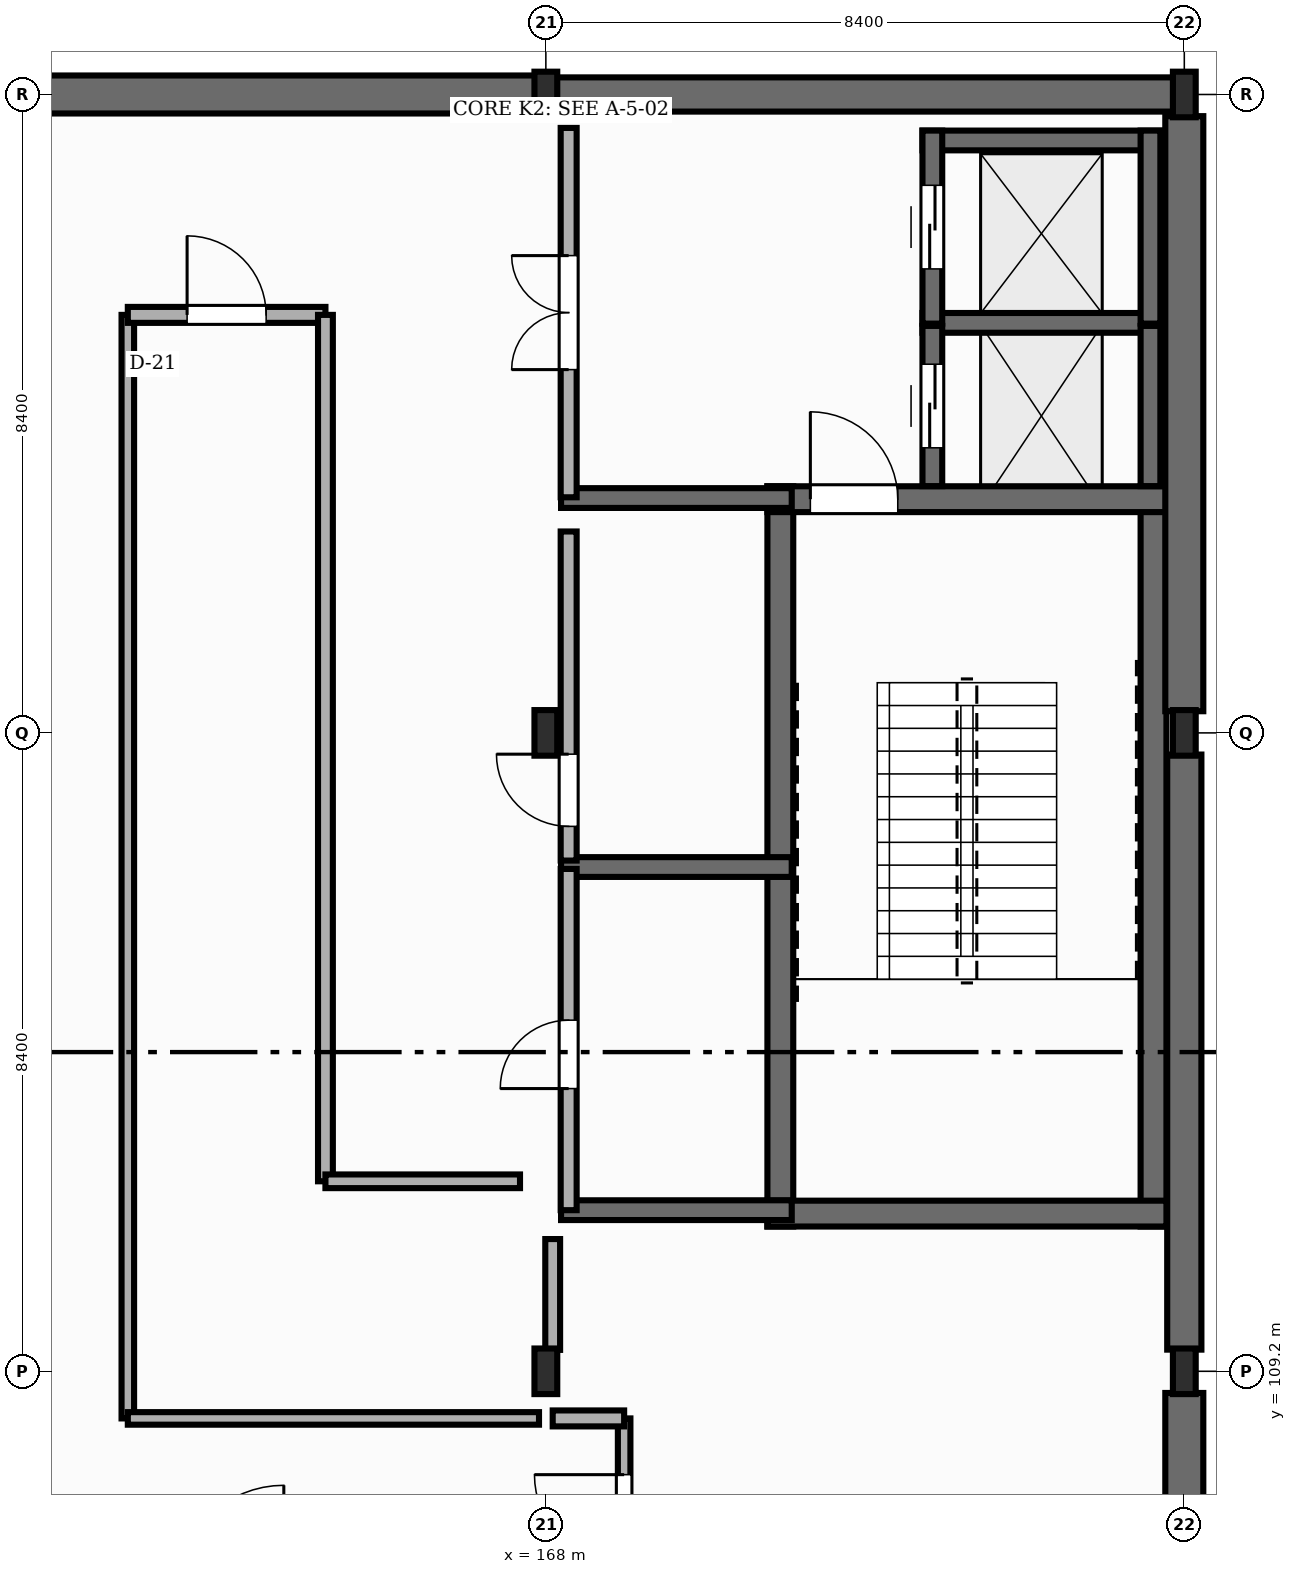
"""IFC4 building model, lengths in metres.
Left out: names, types, materials, properties, quantities, classifications, styles, units other than length and angle.
Written with IfcOpenShell. Run it as: python <this file> out.ifc"""

import sys

from ifc_helpers import new_model, si_unit, direction, frame, frame_2d, origin, origin_2d, place, context, subcontext, project, spatial, rectangle, i_section, extrude, element, fill, save


model = new_model("IFC4")
c1 = context("Model", 3, precision=1e-05, world=origin(), true_north=direction((0.0, 1.0)))
c2 = subcontext(c1, "Body", "Model", "MODEL_VIEW")
j1 = project(units=[si_unit("LENGTHUNIT", "METRE"), si_unit("PLANEANGLEUNIT", "RADIAN")], contexts=[c1])
p1 = place(None, origin())
s1 = spatial("IfcSite", under=j1, at=p1, CompositionType="ELEMENT")
p2 = place(p1, origin())
s2 = spatial("IfcBuilding", under=s1, at=p2, CompositionType="ELEMENT")
p3 = place(p2, frame((0.0, 0.0, -4.5)))
s3 = spatial("IfcBuildingStorey", under=s2, at=p3, CompositionType="ELEMENT", Elevation=-4.5)
for number, where, z_axis, x_axis in (
    (1, (168.0, 109.2, 0.0), (0.0, 0.0, 1.0), (1.0, 0.0, 0.0)),
    (2, (168.0, 117.6, 0.0), (0.0, 0.0, 1.0), (1.0, 0.0, 0.0)),
    (3, (168.0, 126.0, 0.0), (0.0, 0.0, 1.0), (1.0, 0.0, 0.0)),
    (4, (176.4, 109.2, 0.0), (0.0, 0.0, 1.0), (1.0, 0.0, 0.0)),
    (5, (176.4, 117.6, 0.0), (0.0, 0.0, 1.0), (1.0, 0.0, 0.0)),
    (6, (176.4, 126.0, 0.0), (0.0, 0.0, 1.0), (1.0, 0.0, 0.0)),
):
    element("IfcColumn", number, at=place(p3, frame(where, z_axis=z_axis, x_axis=x_axis)), inside=s3, PredefinedType="COLUMN", context=c2, shape_type="SweptSolid", body=[
        extrude(i_section(OverallWidth=0.3, OverallDepth=0.6, WebThickness=0.015, FlangeThickness=0.03, FilletRadius=0.027, at=origin_2d()), origin(), (0.0, 0.0, 1.0), 4.5),
    ])
p4 = place(p3, frame((176.4, 101.085, 0.0), z_axis=(0.0, 0.0, 1.0), x_axis=(0.0, 1.0, 0.0)))
e7 = element("IfcWall", 7, at=p4, inside=s3, PredefinedType="USERDEFINED", context=c2, shape_type="SweptSolid", body=[
    extrude(rectangle(XDim=7.83, YDim=0.5, at=frame_2d((3.915, 0.0))), origin(), (0.0, 0.0, 1.0), 4.25),
])
p5 = place(p3, frame((176.4, 109.485, 0.0), z_axis=(0.0, 0.0, 1.0), x_axis=(0.0, 1.0, 0.0)))
e8 = element("IfcWall", 8, at=p5, inside=s3, PredefinedType="USERDEFINED", context=c2, shape_type="SweptSolid", body=[
    extrude(rectangle(XDim=7.83, YDim=0.45, at=frame_2d((3.915, 0.0))), origin(), (0.0, 0.0, 1.0), 4.25),
])
p6 = place(p3, frame((176.392, 126.0, 0.0), z_axis=(0.0, 0.0, 1.0), x_axis=(-1.0, 0.0, 0.0)))
e9 = element("IfcWall", 9, at=p6, inside=s3, PredefinedType="USERDEFINED", context=c2, shape_type="SweptSolid", body=[
    extrude(rectangle(XDim=8.384, YDim=0.45, at=frame_2d((4.192, 0.0))), origin(), (0.0, 0.0, 1.0), 4.25),
])
p7 = place(p3, frame((167.992, 126.0, 0.0), z_axis=(0.0, 0.0, 1.0), x_axis=(-1.0, 0.0, 0.0)))
e10 = element("IfcWall", 10, at=p7, inside=s3, PredefinedType="USERDEFINED", context=c2, shape_type="SweptSolid", body=[
    extrude(rectangle(XDim=8.384, YDim=0.5, at=frame_2d((4.192, 0.0))), origin(), (0.0, 0.0, 1.0), 4.25),
])
for number, where, z_axis, x_axis in (
    (11, (171.085, 111.105, 0.0), (0.0, 0.0, 1.0), (0.0, 1.0, 0.0)),
    (12, (175.995, 111.105, 0.0), (0.0, 0.0, 1.0), (0.0, 1.0, 0.0)),
):
    element("IfcWall", number, at=place(p3, frame(where, z_axis=z_axis, x_axis=x_axis)), inside=s3, PredefinedType="SHEAR", context=c2, shape_type="SweptSolid", body=[
        extrude(rectangle(XDim=9.74, YDim=0.34, at=frame_2d((4.87, 0.0))), origin(), (0.0, 0.0, 1.0), 4.25),
    ])
p8 = place(p3, frame((170.915, 111.275, 0.0), z_axis=(0.0, 0.0, 1.0), x_axis=(1.0, 0.0, 0.0)))
e13 = element("IfcWall", 13, at=p8, inside=s3, PredefinedType="SHEAR", context=c2, shape_type="SweptSolid", body=[
    extrude(rectangle(XDim=5.25, YDim=0.34, at=frame_2d((2.625, 0.0))), origin(), (0.0, 0.0, 1.0), 4.25),
])
p9 = place(p3, frame((170.915, 120.675, 0.0), z_axis=(0.0, 0.0, 1.0), x_axis=(1.0, 0.0, 0.0)))
e14 = element("IfcWall", 14, at=p9, inside=s3, PredefinedType="SHEAR", context=c2, shape_type="SweptSolid", body=[
    extrude(rectangle(XDim=5.25, YDim=0.34, at=frame_2d((2.625, 0.0))), origin(), (0.0, 0.0, 1.0), 4.25),
])
p10 = place(p9, frame((0.565, 0.0, 0.0)))
e15 = element("IfcOpeningElement", 15, at=p10, cuts=e14, PredefinedType="OPENING", context=c2, shape_type="SweptSolid", body=[
    extrude(rectangle(XDim=1.15, YDim=2.15, at=frame_2d((0.575, 1.075))), frame((0.0, 0.18, 0.0), z_axis=(0.0, -1.0, 0.0), x_axis=(1.0, 0.0, 0.0)), (0.0, 0.0, 1.0), 0.36),
])
p11 = place(p3, frame((172.955, 122.995, 0.0), z_axis=(0.0, 0.0, 1.0), x_axis=(1.0, 0.0, 0.0)))
e16 = element("IfcWall", 16, at=p11, inside=s3, PredefinedType="SHEAR", context=c2, shape_type="SweptSolid", body=[
    extrude(rectangle(XDim=3.13, YDim=0.26, at=frame_2d((1.565, 0.0))), origin(), (0.0, 0.0, 1.0), 4.25),
])
p12 = place(p3, frame((175.955, 120.847, 0.0), z_axis=(0.0, 0.0, 1.0), x_axis=(0.0, 1.0, 0.0)))
e17 = element("IfcWall", 17, at=p12, inside=s3, PredefinedType="SHEAR", context=c2, shape_type="SweptSolid", body=[
    extrude(rectangle(XDim=2.108, YDim=0.26, at=frame_2d((1.054, 0.0))), origin(), (0.0, 0.0, 1.0), 4.25),
])
p13 = place(p3, frame((173.085, 120.847, 0.0), z_axis=(0.0, 0.0, 1.0), x_axis=(0.0, 1.0, 0.0)))
e18 = element("IfcWall", 18, at=p13, inside=s3, PredefinedType="SHEAR", context=c2, shape_type="SweptSolid", body=[
    extrude(rectangle(XDim=2.108, YDim=0.26, at=frame_2d((1.054, 0.0))), origin(), (0.0, 0.0, 1.0), 4.25),
])
p14 = place(p13, frame((0.504, 0.0, 0.0)))
e19 = element("IfcOpeningElement", 19, at=p14, cuts=e18, PredefinedType="OPENING", context=c2, shape_type="SweptSolid", body=[
    extrude(rectangle(XDim=1.1, YDim=2.15, at=frame_2d((0.55, 1.075))), frame((0.0, 0.14, 0.0), z_axis=(0.0, -1.0, 0.0), x_axis=(1.0, 0.0, 0.0)), (0.0, 0.0, 1.0), 0.28),
])
p15 = place(p3, frame((172.955, 125.395, 0.0), z_axis=(0.0, 0.0, 1.0), x_axis=(1.0, 0.0, 0.0)))
e20 = element("IfcWall", 20, at=p15, inside=s3, PredefinedType="SHEAR", context=c2, shape_type="SweptSolid", body=[
    extrude(rectangle(XDim=3.13, YDim=0.26, at=frame_2d((1.565, 0.0))), origin(), (0.0, 0.0, 1.0), 4.25),
])
p16 = place(p3, frame((175.955, 122.985, 0.0), z_axis=(0.0, 0.0, 1.0), x_axis=(0.0, 1.0, 0.0)))
e21 = element("IfcWall", 21, at=p16, inside=s3, PredefinedType="SHEAR", context=c2, shape_type="SweptSolid", body=[
    extrude(rectangle(XDim=2.54, YDim=0.26, at=frame_2d((1.27, 0.0))), origin(), (0.0, 0.0, 1.0), 4.25),
])
p17 = place(p3, frame((173.085, 122.985, 0.0), z_axis=(0.0, 0.0, 1.0), x_axis=(0.0, 1.0, 0.0)))
e22 = element("IfcWall", 22, at=p17, inside=s3, PredefinedType="SHEAR", context=c2, shape_type="SweptSolid", body=[
    extrude(rectangle(XDim=2.54, YDim=0.26, at=frame_2d((1.27, 0.0))), origin(), (0.0, 0.0, 1.0), 4.25),
])
p18 = place(p17, frame((0.72, 0.0, 0.0)))
e23 = element("IfcOpeningElement", 23, at=p18, cuts=e22, PredefinedType="OPENING", context=c2, shape_type="SweptSolid", body=[
    extrude(rectangle(XDim=1.1, YDim=2.15, at=frame_2d((0.55, 1.075))), frame((0.0, 0.14, 0.0), z_axis=(0.0, -1.0, 0.0), x_axis=(1.0, 0.0, 0.0)), (0.0, 0.0, 1.0), 0.28),
])
for number, where, z_axis, x_axis in (
    (24, (168.2, 111.32, 0.0), (0.0, 0.0, 1.0), (1.0, 0.0, 0.0)),
    (25, (168.2, 115.835, 0.0), (0.0, 0.0, 1.0), (1.0, 0.0, 0.0)),
    (26, (168.2, 120.69, 0.0), (0.0, 0.0, 1.0), (1.0, 0.0, 0.0)),
):
    element("IfcWall", number, at=place(p3, frame(where, z_axis=z_axis, x_axis=x_axis)), inside=s3, PredefinedType="SHEAR", context=c2, shape_type="SweptSolid", body=[
        extrude(rectangle(XDim=3.035, YDim=0.26, at=frame_2d((1.518, 0.0))), origin(), (0.0, 0.0, 1.0), 4.25),
    ])
p19 = place(p3, frame((168.3, 111.32, 0.0), z_axis=(0.0, 0.0, 1.0), x_axis=(0.0, 1.0, 0.0)))
e27 = element("IfcWall", 27, at=p19, inside=s3, PredefinedType="STANDARD", context=c2, shape_type="SweptSolid", body=[
    extrude(rectangle(XDim=4.49, YDim=0.21, at=frame_2d((2.245, 0.0))), origin(), (0.0, 0.0, 1.0), 3.922),
])
p20 = place(p19, frame((1.6, 0.0, 0.0)))
e28 = element("IfcOpeningElement", 28, at=p20, cuts=e27, PredefinedType="OPENING", context=c2, shape_type="SweptSolid", body=[
    extrude(rectangle(XDim=0.9, YDim=2.1, at=frame_2d((0.45, 1.05))), frame((0.0, 0.115, 0.0), z_axis=(0.0, -1.0, 0.0), x_axis=(1.0, 0.0, 0.0)), (0.0, 0.0, 1.0), 0.23),
])
p21 = place(p3, frame((168.3, 115.92, 0.0), z_axis=(0.0, 0.0, 1.0), x_axis=(0.0, 1.0, 0.0)))
e29 = element("IfcWall", 29, at=p21, inside=s3, PredefinedType="STANDARD", context=c2, shape_type="SweptSolid", body=[
    extrude(rectangle(XDim=4.33, YDim=0.21, at=frame_2d((2.165, 0.0))), origin(), (0.0, 0.0, 1.0), 3.632),
])
p22 = place(p21, frame((0.45, 0.0, 0.0)))
e30 = element("IfcOpeningElement", 30, at=p22, cuts=e29, PredefinedType="OPENING", context=c2, shape_type="SweptSolid", body=[
    extrude(rectangle(XDim=0.95, YDim=2.15, at=frame_2d((0.475, 1.075))), frame((0.0, 0.115, 0.0), z_axis=(0.0, -1.0, 0.0), x_axis=(1.0, 0.0, 0.0)), (0.0, 0.0, 1.0), 0.23),
])
p23 = place(p3, frame((168.3, 120.7, 0.0), z_axis=(0.0, 0.0, 1.0), x_axis=(0.0, 1.0, 0.0)))
e31 = element("IfcWall", 31, at=p23, inside=s3, PredefinedType="STANDARD", context=c2, shape_type="SweptSolid", body=[
    extrude(rectangle(XDim=4.86, YDim=0.21, at=frame_2d((2.43, 0.0))), origin(), (0.0, 0.0, 1.0), 3.632),
])
p24 = place(p23, frame((1.68, 0.0, 0.0)))
e32 = element("IfcOpeningElement", 32, at=p24, cuts=e31, PredefinedType="OPENING", context=c2, shape_type="SweptSolid", body=[
    extrude(rectangle(XDim=1.5, YDim=2.2, at=frame_2d((0.75, 1.1))), frame((0.0, 0.115, 0.0), z_axis=(0.0, -1.0, 0.0), x_axis=(1.0, 0.0, 0.0)), (0.0, 0.0, 1.0), 0.23),
])
p25 = place(p3, frame((169.03, 106.3, -0.004), z_axis=(0.0, 0.0, 1.0), x_axis=(0.0, 1.0, 0.0)))
e33 = element("IfcWall", 33, at=p25, inside=s3, PredefinedType="STANDARD", context=c2, shape_type="SweptSolid", body=[
    extrude(rectangle(XDim=2.28, YDim=0.165, at=frame_2d((1.14, 0.0))), origin(), (0.0, 0.0, 1.0), 4.254),
])
p26 = place(p25, frame((0.36, 0.0, 0.015)))
e34 = element("IfcOpeningElement", 34, at=p26, cuts=e33, PredefinedType="OPENING", context=c2, shape_type="SweptSolid", body=[
    extrude(rectangle(XDim=1.18, YDim=2.14, at=frame_2d((0.59, 1.07))), frame((0.0, 0.093, 0.0), z_axis=(0.0, -1.0, 0.0), x_axis=(1.0, 0.0, 0.0)), (0.0, 0.0, 1.0), 0.185),
])
p27 = place(p3, frame((169.03, 108.58, -0.004), z_axis=(0.0, 0.0, 1.0), x_axis=(-1.0, 0.0, 0.0)))
e35 = element("IfcWall", 35, at=p27, inside=s3, PredefinedType="STANDARD", context=c2, shape_type="SweptSolid", body=[
    extrude(rectangle(XDim=0.94, YDim=0.21, at=frame_2d((0.47, 0.0))), origin(), (0.0, 0.0, 1.0), 4.254),
])
p28 = place(p3, frame((168.09, 109.482, -0.004), z_axis=(0.0, 0.0, 1.0), x_axis=(0.0, 1.0, 0.0)))
e36 = element("IfcWall", 36, at=p28, inside=s3, PredefinedType="STANDARD", context=c2, shape_type="SweptSolid", body=[
    extrude(rectangle(XDim=1.458, YDim=0.195, at=frame_2d((0.729, 0.0))), origin(), (0.0, 0.0, 1.0), 3.926),
])
p29 = place(p3, frame((162.5, 108.58, -0.004), z_axis=(0.0, 0.0, 1.0), x_axis=(0.0, 1.0, 0.0)))
e37 = element("IfcWall", 37, at=p29, inside=s3, PredefinedType="STANDARD", context=c2, shape_type="SweptSolid", body=[
    extrude(rectangle(XDim=14.52, YDim=0.165, at=frame_2d((7.26, 0.0))), origin(), (0.0, 0.0, 1.0), 3.936),
])
p30 = place(p3, frame((162.5, 123.1, -0.004), z_axis=(0.0, 0.0, 1.0), x_axis=(1.0, 0.0, 0.0)))
e38 = element("IfcWall", 38, at=p30, inside=s3, PredefinedType="STANDARD", context=c2, shape_type="SweptSolid", body=[
    extrude(rectangle(XDim=2.6, YDim=0.21, at=frame_2d((1.3, 0.0))), origin(), (0.0, 0.0, 1.0), 4.254),
])
p31 = place(p30, frame((0.78, 0.0, 0.015)))
e39 = element("IfcOpeningElement", 39, at=p31, cuts=e38, PredefinedType="OPENING", context=c2, shape_type="SweptSolid", body=[
    extrude(rectangle(XDim=1.04, YDim=2.22, at=frame_2d((0.52, 1.11))), frame((0.0, 0.115, 0.0), z_axis=(0.0, -1.0, 0.0), x_axis=(1.0, 0.0, 0.0)), (0.0, 0.0, 1.0), 0.23),
])
p32 = place(p3, frame((165.1, 123.1, -0.004), z_axis=(0.0, 0.0, 1.0), x_axis=(0.0, -1.0, 0.0)))
e40 = element("IfcWall", 40, at=p32, inside=s3, PredefinedType="STANDARD", context=c2, shape_type="SweptSolid", body=[
    extrude(rectangle(XDim=11.4, YDim=0.195, at=frame_2d((5.7, 0.0))), origin(), (0.0, 0.0, 1.0), 3.966),
])
p33 = place(p3, frame((165.1, 111.7, -0.004), z_axis=(0.0, 0.0, 1.0), x_axis=(1.0, 0.0, 0.0)))
e41 = element("IfcWall", 41, at=p33, inside=s3, PredefinedType="STANDARD", context=c2, shape_type="SweptSolid", body=[
    extrude(rectangle(XDim=2.56, YDim=0.18, at=frame_2d((1.28, 0.0))), origin(), (0.0, 0.0, 1.0), 4.254),
])
p34 = place(p3, frame((167.91, 108.58, -0.004), z_axis=(0.0, 0.0, 1.0), x_axis=(-1.0, 0.0, 0.0)))
e42 = element("IfcWall", 42, at=p34, inside=s3, PredefinedType="STANDARD", context=c2, shape_type="SweptSolid", body=[
    extrude(rectangle(XDim=5.41, YDim=0.165, at=frame_2d((2.705, 0.0))), origin(), (0.0, 0.0, 1.0), 4.254),
])
p35 = place(p3, frame((176.4, 117.885, 0.0), z_axis=(0.0, 0.0, 1.0), x_axis=(0.0, 1.0, 0.0)))
e43 = element("IfcWall", 43, at=p35, inside=s3, PredefinedType="USERDEFINED", context=c2, shape_type="SweptSolid", body=[
    extrude(rectangle(XDim=7.83, YDim=0.5, at=frame_2d((3.915, 0.0))), origin(), (0.0, 0.0, 1.0), 4.25),
])
p36 = place(p10, origin())
e44 = element("IfcDoor", 44, at=p36, inside=s3, OperationType="SINGLE_SWING_LEFT", PredefinedType="DOOR", context=c2, shape_type="SweptSolid", body=[
    extrude(rectangle(XDim=1.15, YDim=2.15, at=frame_2d((0.575, 1.075))), frame((0.0, 0.025, 0.0), z_axis=(0.0, -1.0, 0.0), x_axis=(1.0, 0.0, 0.0)), (0.0, 0.0, 1.0), 0.05),
])
fill(e15, e44)
p37 = place(p14, origin())
e45 = element("IfcDoor", 45, at=p37, inside=s3, OperationType="DOUBLE_DOOR_SLIDING", PredefinedType="DOOR", context=c2, shape_type="SweptSolid", body=[
    extrude(rectangle(XDim=1.1, YDim=2.15, at=frame_2d((0.55, 1.075))), frame((0.0, 0.025, 0.0), z_axis=(0.0, -1.0, 0.0), x_axis=(1.0, 0.0, 0.0)), (0.0, 0.0, 1.0), 0.05),
])
fill(e19, e45)
p38 = place(p18, origin())
e46 = element("IfcDoor", 46, at=p38, inside=s3, OperationType="DOUBLE_DOOR_SLIDING", PredefinedType="DOOR", context=c2, shape_type="SweptSolid", body=[
    extrude(rectangle(XDim=1.1, YDim=2.15, at=frame_2d((0.55, 1.075))), frame((0.0, 0.025, 0.0), z_axis=(0.0, -1.0, 0.0), x_axis=(1.0, 0.0, 0.0)), (0.0, 0.0, 1.0), 0.05),
])
fill(e23, e46)
p39 = place(p20, origin())
e47 = element("IfcDoor", 47, at=p39, inside=s3, OperationType="SINGLE_SWING_LEFT", PredefinedType="DOOR", context=c2, shape_type="SweptSolid", body=[
    extrude(rectangle(XDim=0.9, YDim=2.1, at=frame_2d((0.45, 1.05))), frame((0.0, 0.025, 0.0), z_axis=(0.0, -1.0, 0.0), x_axis=(1.0, 0.0, 0.0)), (0.0, 0.0, 1.0), 0.05),
])
fill(e28, e47)
p40 = place(p22, origin())
e48 = element("IfcDoor", 48, at=p40, inside=s3, OperationType="SINGLE_SWING_RIGHT", PredefinedType="DOOR", context=c2, shape_type="SweptSolid", body=[
    extrude(rectangle(XDim=0.95, YDim=2.15, at=frame_2d((0.475, 1.075))), frame((0.0, 0.025, 0.0), z_axis=(0.0, -1.0, 0.0), x_axis=(1.0, 0.0, 0.0)), (0.0, 0.0, 1.0), 0.05),
])
fill(e30, e48)
p41 = place(p24, origin())
e49 = element("IfcDoor", 49, at=p41, inside=s3, OperationType="DOUBLE_DOOR_SINGLE_SWING", PredefinedType="DOOR", context=c2, shape_type="SweptSolid", body=[
    extrude(rectangle(XDim=1.5, YDim=2.2, at=frame_2d((0.75, 1.1))), frame((0.0, 0.025, 0.0), z_axis=(0.0, -1.0, 0.0), x_axis=(1.0, 0.0, 0.0)), (0.0, 0.0, 1.0), 0.05),
])
fill(e32, e49)
p42 = place(p26, origin())
e50 = element("IfcDoor", 50, at=p42, inside=s3, OperationType="SINGLE_SWING_RIGHT", PredefinedType="DOOR", context=c2, shape_type="SweptSolid", body=[
    extrude(rectangle(XDim=1.18, YDim=2.14, at=frame_2d((0.59, 1.07))), frame((0.0, 0.025, 0.0), z_axis=(0.0, -1.0, 0.0), x_axis=(1.0, 0.0, 0.0)), (0.0, 0.0, 1.0), 0.05),
])
fill(e34, e50)
p43 = place(p31, origin())
e51 = element("IfcDoor", 51, at=p43, inside=s3, OperationType="SINGLE_SWING_LEFT", PredefinedType="DOOR", context=c2, shape_type="SweptSolid", body=[
    extrude(rectangle(XDim=1.04, YDim=2.22, at=frame_2d((0.52, 1.11))), frame((0.0, 0.025, 0.0), z_axis=(0.0, -1.0, 0.0), x_axis=(1.0, 0.0, 0.0)), (0.0, 0.0, 1.0), 0.05),
])
fill(e39, e51)
save(model, sys.argv[1])
